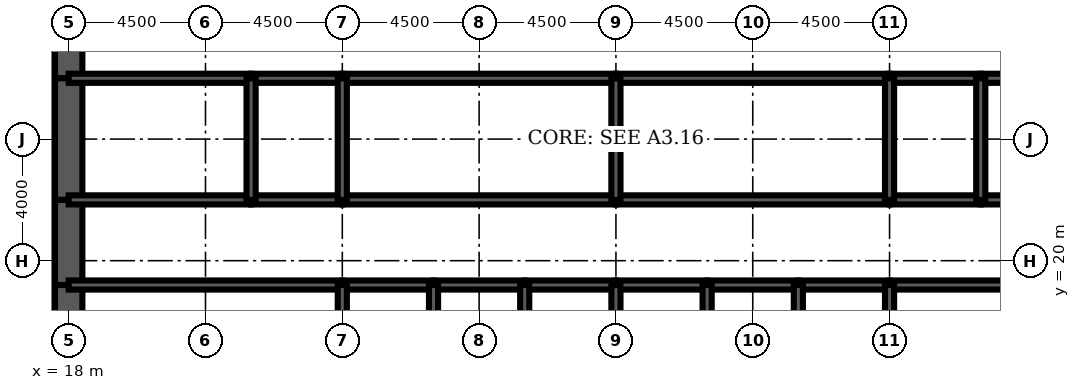
"""IFC4 building model, lengths in metres.
Left out: names, types, materials, properties, quantities, classifications, styles, units other than length and angle.
Written with IfcOpenShell. Run it as: python <this file> out.ifc"""

import sys

from ifc_helpers import new_model, si_unit, direction, frame, frame_2d, origin, place, context, subcontext, project, spatial, rectangle, extrude, element, fill, save


model = new_model("IFC4")
c1 = context("Model", 3, precision=1e-05, world=origin(), true_north=direction((0.0, 1.0)))
c2 = subcontext(c1, "Body", "Model", "MODEL_VIEW")
j1 = project(units=[si_unit("LENGTHUNIT", "METRE"), si_unit("PLANEANGLEUNIT", "RADIAN")], contexts=[c1])
p1 = place(None, origin())
s1 = spatial("IfcSite", under=j1, at=p1, CompositionType="ELEMENT")
p2 = place(p1, origin())
s2 = spatial("IfcBuilding", under=s1, at=p2, CompositionType="ELEMENT")
p3 = place(p2, frame((0.0, 0.0, 68.0)))
s3 = spatial("IfcBuildingStorey", under=s2, at=p3, CompositionType="ELEMENT", Elevation=68.0)
p4 = place(p3, frame((18.0, 28.8, 0.0), z_axis=(0.0, 0.0, 1.0), x_axis=(0.0, -1.0, 0.0)))
e1 = element("IfcWall", 1, at=p4, inside=s3, PredefinedType="SHEAR", context=c2, shape_type="SweptSolid", body=[
    extrude(rectangle(XDim=2.8, YDim=0.9, at=frame_2d((1.4, 0.0))), origin(), (0.0, 0.0, 1.0), 4.5),
])
p5 = place(p4, frame((0.4, 0.0, 0.0)))
e2 = element("IfcOpeningElement", 2, at=p5, cuts=e1, PredefinedType="OPENING", context=c2, shape_type="SweptSolid", body=[
    extrude(rectangle(XDim=1.8, YDim=2.1, at=frame_2d((0.9, 1.05))), frame((0.0, 0.46, 0.0), z_axis=(0.0, -1.0, 0.0), x_axis=(1.0, 0.0, 0.0)), (0.0, 0.0, 1.0), 0.92),
])
p6 = place(p3, frame((18.0, 26.0, 0.0), z_axis=(0.0, 0.0, 1.0), x_axis=(0.0, -1.0, 0.0)))
e3 = element("IfcWall", 3, at=p6, inside=s3, PredefinedType="SHEAR", context=c2, shape_type="SweptSolid", body=[
    extrude(rectangle(XDim=4.0, YDim=0.9, at=frame_2d((2.0, 0.0))), origin(), (0.0, 0.0, 1.0), 4.5),
])
p7 = place(p3, frame((18.0, 22.0, 0.0), z_axis=(0.0, 0.0, 1.0), x_axis=(0.0, -1.0, 0.0)))
e4 = element("IfcWall", 4, at=p7, inside=s3, PredefinedType="SHEAR", context=c2, shape_type="SweptSolid", body=[
    extrude(rectangle(XDim=2.8, YDim=0.9, at=frame_2d((1.4, 0.0))), origin(), (0.0, 0.0, 1.0), 4.5),
])
p8 = place(p7, frame((0.6, 0.0, 0.0)))
e5 = element("IfcOpeningElement", 5, at=p8, cuts=e4, PredefinedType="OPENING", context=c2, shape_type="SweptSolid", body=[
    extrude(rectangle(XDim=1.8, YDim=2.1, at=frame_2d((0.9, 1.05))), frame((0.0, 0.46, 0.0), z_axis=(0.0, -1.0, 0.0), x_axis=(1.0, 0.0, 0.0)), (0.0, 0.0, 1.0), 0.92),
])
p9 = place(p3, frame((18.0, 19.2, 0.0), z_axis=(0.0, 0.0, 1.0), x_axis=(0.0, -1.0, 0.0)))
e6 = element("IfcWall", 6, at=p9, inside=s3, PredefinedType="SHEAR", context=c2, shape_type="SweptSolid", body=[
    extrude(rectangle(XDim=3.2, YDim=0.9, at=frame_2d((1.6, 0.0))), origin(), (0.0, 0.0, 1.0), 4.5),
])
p10 = place(p3, frame((18.0, 19.2, 0.0), z_axis=(0.0, 0.0, 1.0), x_axis=(1.0, 0.0, 0.0)))
e7 = element("IfcWall", 7, at=p10, inside=s3, PredefinedType="SOLIDWALL", context=c2, shape_type="SweptSolid", body=[
    extrude(rectangle(XDim=9.0, YDim=0.3, at=frame_2d((4.5, 0.0))), origin(), (0.0, 0.0, 1.0), 4.5),
])
p11 = place(p10, frame((0.65, 0.0, 0.0)))
e8 = element("IfcOpeningElement", 8, at=p11, cuts=e7, PredefinedType="OPENING", context=c2, shape_type="SweptSolid", body=[
    extrude(rectangle(XDim=1.0, YDim=2.1, at=frame_2d((0.5, 1.05))), frame((0.0, 0.16, 0.0), z_axis=(0.0, -1.0, 0.0), x_axis=(1.0, 0.0, 0.0)), (0.0, 0.0, 1.0), 0.32),
])
p12 = place(p3, frame((27.0, 19.2, 0.0), z_axis=(0.0, 0.0, 1.0), x_axis=(1.0, 0.0, 0.0)))
e9 = element("IfcWall", 9, at=p12, inside=s3, PredefinedType="SOLIDWALL", context=c2, shape_type="SweptSolid", body=[
    extrude(rectangle(XDim=3.0, YDim=0.3, at=frame_2d((1.5, 0.0))), origin(), (0.0, 0.0, 1.0), 4.5),
])
p13 = place(p12, frame((0.95, 0.0, 0.0)))
e10 = element("IfcOpeningElement", 10, at=p13, cuts=e9, PredefinedType="OPENING", context=c2, shape_type="SweptSolid", body=[
    extrude(rectangle(XDim=1.1, YDim=2.2, at=frame_2d((0.55, 1.1))), frame((0.0, 0.16, 0.0), z_axis=(0.0, -1.0, 0.0), x_axis=(1.0, 0.0, 0.0)), (0.0, 0.0, 1.0), 0.32),
])
p14 = place(p3, frame((30.0, 19.2, 0.0), z_axis=(0.0, 0.0, 1.0), x_axis=(1.0, 0.0, 0.0)))
e11 = element("IfcWall", 11, at=p14, inside=s3, PredefinedType="SOLIDWALL", context=c2, shape_type="SweptSolid", body=[
    extrude(rectangle(XDim=3.0, YDim=0.3, at=frame_2d((1.5, 0.0))), origin(), (0.0, 0.0, 1.0), 4.5),
])
p15 = place(p14, frame((0.95, 0.0, 0.0)))
e12 = element("IfcOpeningElement", 12, at=p15, cuts=e11, PredefinedType="OPENING", context=c2, shape_type="SweptSolid", body=[
    extrude(rectangle(XDim=1.1, YDim=2.2, at=frame_2d((0.55, 1.1))), frame((0.0, 0.16, 0.0), z_axis=(0.0, -1.0, 0.0), x_axis=(1.0, 0.0, 0.0)), (0.0, 0.0, 1.0), 0.32),
])
p16 = place(p3, frame((33.0, 19.2, 0.0), z_axis=(0.0, 0.0, 1.0), x_axis=(1.0, 0.0, 0.0)))
e13 = element("IfcWall", 13, at=p16, inside=s3, PredefinedType="SOLIDWALL", context=c2, shape_type="SweptSolid", body=[
    extrude(rectangle(XDim=3.0, YDim=0.3, at=frame_2d((1.5, 0.0))), origin(), (0.0, 0.0, 1.0), 4.5),
])
p17 = place(p16, frame((0.95, 0.0, 0.0)))
e14 = element("IfcOpeningElement", 14, at=p17, cuts=e13, PredefinedType="OPENING", context=c2, shape_type="SweptSolid", body=[
    extrude(rectangle(XDim=1.1, YDim=2.2, at=frame_2d((0.55, 1.1))), frame((0.0, 0.16, 0.0), z_axis=(0.0, -1.0, 0.0), x_axis=(1.0, 0.0, 0.0)), (0.0, 0.0, 1.0), 0.32),
])
p18 = place(p3, frame((36.0, 19.2, 0.0), z_axis=(0.0, 0.0, 1.0), x_axis=(1.0, 0.0, 0.0)))
e15 = element("IfcWall", 15, at=p18, inside=s3, PredefinedType="SOLIDWALL", context=c2, shape_type="SweptSolid", body=[
    extrude(rectangle(XDim=3.0, YDim=0.3, at=frame_2d((1.5, 0.0))), origin(), (0.0, 0.0, 1.0), 4.5),
])
p19 = place(p18, frame((0.95, 0.0, 0.0)))
e16 = element("IfcOpeningElement", 16, at=p19, cuts=e15, PredefinedType="OPENING", context=c2, shape_type="SweptSolid", body=[
    extrude(rectangle(XDim=1.1, YDim=2.2, at=frame_2d((0.55, 1.1))), frame((0.0, 0.16, 0.0), z_axis=(0.0, -1.0, 0.0), x_axis=(1.0, 0.0, 0.0)), (0.0, 0.0, 1.0), 0.32),
])
for number, where, z_axis, x_axis in (
    (17, (39.0, 19.2, 0.0), (0.0, 0.0, 1.0), (1.0, 0.0, 0.0)),
    (18, (42.0, 19.2, 0.0), (0.0, 0.0, 1.0), (1.0, 0.0, 0.0)),
):
    element("IfcWall", number, at=place(p3, frame(where, z_axis=z_axis, x_axis=x_axis)), inside=s3, PredefinedType="SOLIDWALL", context=c2, shape_type="SweptSolid", body=[
        extrude(rectangle(XDim=3.0, YDim=0.3, at=frame_2d((1.5, 0.0))), origin(), (0.0, 0.0, 1.0), 4.5),
    ])
p20 = place(p3, frame((45.0, 19.2, 0.0), z_axis=(0.0, 0.0, 1.0), x_axis=(1.0, 0.0, 0.0)))
e19 = element("IfcWall", 19, at=p20, inside=s3, PredefinedType="SOLIDWALL", context=c2, shape_type="SweptSolid", body=[
    extrude(rectangle(XDim=9.0, YDim=0.3, at=frame_2d((4.5, 0.0))), origin(), (0.0, 0.0, 1.0), 4.5),
])
p21 = place(p20, frame((7.35, 0.0, 0.0)))
e20 = element("IfcOpeningElement", 20, at=p21, cuts=e19, PredefinedType="OPENING", context=c2, shape_type="SweptSolid", body=[
    extrude(rectangle(XDim=1.0, YDim=2.1, at=frame_2d((0.5, 1.05))), frame((0.0, 0.16, 0.0), z_axis=(0.0, -1.0, 0.0), x_axis=(1.0, 0.0, 0.0)), (0.0, 0.0, 1.0), 0.32),
])
p22 = place(p3, frame((18.0, 22.0, 0.0), z_axis=(0.0, 0.0, 1.0), x_axis=(1.0, 0.0, 0.0)))
e21 = element("IfcWall", 21, at=p22, inside=s3, PredefinedType="SOLIDWALL", context=c2, shape_type="SweptSolid", body=[
    extrude(rectangle(XDim=6.0, YDim=0.3, at=frame_2d((3.0, 0.0))), origin(), (0.0, 0.0, 1.0), 4.5),
])
p23 = place(p22, frame((4.4, 0.0, 0.0)))
e22 = element("IfcOpeningElement", 22, at=p23, cuts=e21, PredefinedType="OPENING", context=c2, shape_type="SweptSolid", body=[
    extrude(rectangle(XDim=1.0, YDim=2.1, at=frame_2d((0.5, 1.05))), frame((0.0, 0.16, 0.0), z_axis=(0.0, -1.0, 0.0), x_axis=(1.0, 0.0, 0.0)), (0.0, 0.0, 1.0), 0.32),
])
p24 = place(p22, frame((0.7, 0.0, 0.0)))
e23 = element("IfcOpeningElement", 23, at=p24, cuts=e21, PredefinedType="OPENING", context=c2, shape_type="SweptSolid", body=[
    extrude(rectangle(XDim=1.0, YDim=2.1, at=frame_2d((0.5, 1.05))), frame((0.0, 0.16, 0.0), z_axis=(0.0, -1.0, 0.0), x_axis=(1.0, 0.0, 0.0)), (0.0, 0.0, 1.0), 0.32),
])
p25 = place(p3, frame((24.0, 22.0, 0.0), z_axis=(0.0, 0.0, 1.0), x_axis=(1.0, 0.0, 0.0)))
e24 = element("IfcWall", 24, at=p25, inside=s3, PredefinedType="SOLIDWALL", context=c2, shape_type="SweptSolid", body=[
    extrude(rectangle(XDim=3.0, YDim=0.3, at=frame_2d((1.5, 0.0))), origin(), (0.0, 0.0, 1.0), 4.5),
])
p26 = place(p25, frame((1.0, 0.0, 0.0)))
e25 = element("IfcOpeningElement", 25, at=p26, cuts=e24, PredefinedType="OPENING", context=c2, shape_type="SweptSolid", body=[
    extrude(rectangle(XDim=1.0, YDim=2.1, at=frame_2d((0.5, 1.05))), frame((0.0, 0.16, 0.0), z_axis=(0.0, -1.0, 0.0), x_axis=(1.0, 0.0, 0.0)), (0.0, 0.0, 1.0), 0.32),
])
p27 = place(p3, frame((27.0, 22.0, 0.0), z_axis=(0.0, 0.0, 1.0), x_axis=(1.0, 0.0, 0.0)))
e26 = element("IfcWall", 26, at=p27, inside=s3, PredefinedType="SOLIDWALL", context=c2, shape_type="SweptSolid", body=[
    extrude(rectangle(XDim=9.0, YDim=0.3, at=frame_2d((4.5, 0.0))), origin(), (0.0, 0.0, 1.0), 4.5),
])
p28 = place(p27, frame((4.0, 0.0, 0.0)))
e27 = element("IfcOpeningElement", 27, at=p28, cuts=e26, PredefinedType="OPENING", context=c2, shape_type="SweptSolid", body=[
    extrude(rectangle(XDim=1.0, YDim=2.1, at=frame_2d((0.5, 1.05))), frame((0.0, 0.16, 0.0), z_axis=(0.0, -1.0, 0.0), x_axis=(1.0, 0.0, 0.0)), (0.0, 0.0, 1.0), 0.32),
])
p29 = place(p3, frame((36.0, 22.0, 0.0), z_axis=(0.0, 0.0, 1.0), x_axis=(1.0, 0.0, 0.0)))
e28 = element("IfcWall", 28, at=p29, inside=s3, PredefinedType="SOLIDWALL", context=c2, shape_type="SweptSolid", body=[
    extrude(rectangle(XDim=9.0, YDim=0.3, at=frame_2d((4.5, 0.0))), origin(), (0.0, 0.0, 1.0), 4.5),
])
p30 = place(p29, frame((4.0, 0.0, 0.0)))
e29 = element("IfcOpeningElement", 29, at=p30, cuts=e28, PredefinedType="OPENING", context=c2, shape_type="SweptSolid", body=[
    extrude(rectangle(XDim=1.0, YDim=2.1, at=frame_2d((0.5, 1.05))), frame((0.0, 0.16, 0.0), z_axis=(0.0, -1.0, 0.0), x_axis=(1.0, 0.0, 0.0)), (0.0, 0.0, 1.0), 0.32),
])
p31 = place(p3, frame((45.0, 22.0, 0.0), z_axis=(0.0, 0.0, 1.0), x_axis=(1.0, 0.0, 0.0)))
e30 = element("IfcWall", 30, at=p31, inside=s3, PredefinedType="SOLIDWALL", context=c2, shape_type="SweptSolid", body=[
    extrude(rectangle(XDim=3.0, YDim=0.3, at=frame_2d((1.5, 0.0))), origin(), (0.0, 0.0, 1.0), 4.5),
])
p32 = place(p31, frame((1.0, 0.0, 0.0)))
e31 = element("IfcOpeningElement", 31, at=p32, cuts=e30, PredefinedType="OPENING", context=c2, shape_type="SweptSolid", body=[
    extrude(rectangle(XDim=1.0, YDim=2.1, at=frame_2d((0.5, 1.05))), frame((0.0, 0.16, 0.0), z_axis=(0.0, -1.0, 0.0), x_axis=(1.0, 0.0, 0.0)), (0.0, 0.0, 1.0), 0.32),
])
p33 = place(p3, frame((48.0, 22.0, 0.0), z_axis=(0.0, 0.0, 1.0), x_axis=(1.0, 0.0, 0.0)))
e32 = element("IfcWall", 32, at=p33, inside=s3, PredefinedType="SOLIDWALL", context=c2, shape_type="SweptSolid", body=[
    extrude(rectangle(XDim=6.0, YDim=0.3, at=frame_2d((3.0, 0.0))), origin(), (0.0, 0.0, 1.0), 4.5),
])
p34 = place(p33, frame((2.0, 0.0, 0.0)))
e33 = element("IfcOpeningElement", 33, at=p34, cuts=e32, PredefinedType="OPENING", context=c2, shape_type="SweptSolid", body=[
    extrude(rectangle(XDim=1.0, YDim=2.1, at=frame_2d((0.5, 1.05))), frame((0.0, 0.16, 0.0), z_axis=(0.0, -1.0, 0.0), x_axis=(1.0, 0.0, 0.0)), (0.0, 0.0, 1.0), 0.32),
])
p35 = place(p33, frame((4.0, 0.0, 0.0)))
e34 = element("IfcOpeningElement", 34, at=p35, cuts=e32, PredefinedType="OPENING", context=c2, shape_type="SweptSolid", body=[
    extrude(rectangle(XDim=1.0, YDim=2.1, at=frame_2d((0.5, 1.05))), frame((0.0, 0.16, 0.0), z_axis=(0.0, -1.0, 0.0), x_axis=(1.0, 0.0, 0.0)), (0.0, 0.0, 1.0), 0.32),
])
p36 = place(p3, frame((18.0, 26.0, 0.0), z_axis=(0.0, 0.0, 1.0), x_axis=(1.0, 0.0, 0.0)))
e35 = element("IfcWall", 35, at=p36, inside=s3, PredefinedType="SOLIDWALL", context=c2, shape_type="SweptSolid", body=[
    extrude(rectangle(XDim=6.0, YDim=0.3, at=frame_2d((3.0, 0.0))), origin(), (0.0, 0.0, 1.0), 4.5),
])
p37 = place(p3, frame((24.0, 26.0, 0.0), z_axis=(0.0, 0.0, 1.0), x_axis=(1.0, 0.0, 0.0)))
e36 = element("IfcWall", 36, at=p37, inside=s3, PredefinedType="SOLIDWALL", context=c2, shape_type="SweptSolid", body=[
    extrude(rectangle(XDim=3.0, YDim=0.3, at=frame_2d((1.5, 0.0))), origin(), (0.0, 0.0, 1.0), 4.5),
])
for number, where, z_axis, x_axis in (
    (37, (27.0, 26.0, 0.0), (0.0, 0.0, 1.0), (1.0, 0.0, 0.0)),
    (38, (36.0, 26.0, 0.0), (0.0, 0.0, 1.0), (1.0, 0.0, 0.0)),
):
    element("IfcWall", number, at=place(p3, frame(where, z_axis=z_axis, x_axis=x_axis)), inside=s3, PredefinedType="SOLIDWALL", context=c2, shape_type="SweptSolid", body=[
        extrude(rectangle(XDim=9.0, YDim=0.3, at=frame_2d((4.5, 0.0))), origin(), (0.0, 0.0, 1.0), 4.5),
    ])
p38 = place(p3, frame((45.0, 26.0, 0.0), z_axis=(0.0, 0.0, 1.0), x_axis=(1.0, 0.0, 0.0)))
e39 = element("IfcWall", 39, at=p38, inside=s3, PredefinedType="SOLIDWALL", context=c2, shape_type="SweptSolid", body=[
    extrude(rectangle(XDim=3.0, YDim=0.3, at=frame_2d((1.5, 0.0))), origin(), (0.0, 0.0, 1.0), 4.5),
])
p39 = place(p3, frame((48.0, 26.0, 0.0), z_axis=(0.0, 0.0, 1.0), x_axis=(1.0, 0.0, 0.0)))
e40 = element("IfcWall", 40, at=p39, inside=s3, PredefinedType="SOLIDWALL", context=c2, shape_type="SweptSolid", body=[
    extrude(rectangle(XDim=6.0, YDim=0.3, at=frame_2d((3.0, 0.0))), origin(), (0.0, 0.0, 1.0), 4.5),
])
for number, where, z_axis, x_axis in (
    (41, (27.0, 16.0, 0.0), (0.0, 0.0, 1.0), (0.0, 1.0, 0.0)),
    (42, (30.0, 16.0, 0.0), (0.0, 0.0, 1.0), (0.0, 1.0, 0.0)),
    (43, (33.0, 16.0, 0.0), (0.0, 0.0, 1.0), (0.0, 1.0, 0.0)),
    (44, (36.0, 16.0, 0.0), (0.0, 0.0, 1.0), (0.0, 1.0, 0.0)),
    (45, (39.0, 16.0, 0.0), (0.0, 0.0, 1.0), (0.0, 1.0, 0.0)),
    (46, (42.0, 16.0, 0.0), (0.0, 0.0, 1.0), (0.0, 1.0, 0.0)),
    (47, (45.0, 16.0, 0.0), (0.0, 0.0, 1.0), (0.0, 1.0, 0.0)),
):
    element("IfcWall", number, at=place(p3, frame(where, z_axis=z_axis, x_axis=x_axis)), inside=s3, PredefinedType="SOLIDWALL", context=c2, shape_type="SweptSolid", body=[
        extrude(rectangle(XDim=3.2, YDim=0.3, at=frame_2d((1.6, 0.0))), origin(), (0.0, 0.0, 1.0), 4.5),
    ])
for number, where, z_axis, x_axis in (
    (48, (24.0, 22.0, 0.0), (0.0, 0.0, 1.0), (0.0, 1.0, 0.0)),
    (49, (27.0, 22.0, 0.0), (0.0, 0.0, 1.0), (0.0, 1.0, 0.0)),
    (50, (36.0, 22.0, 0.0), (0.0, 0.0, 1.0), (0.0, 1.0, 0.0)),
    (51, (45.0, 22.0, 0.0), (0.0, 0.0, 1.0), (0.0, 1.0, 0.0)),
    (52, (48.0, 22.0, 0.0), (0.0, 0.0, 1.0), (0.0, 1.0, 0.0)),
):
    element("IfcWall", number, at=place(p3, frame(where, z_axis=z_axis, x_axis=x_axis)), inside=s3, PredefinedType="SOLIDWALL", context=c2, shape_type="SweptSolid", body=[
        extrude(rectangle(XDim=4.0, YDim=0.3, at=frame_2d((2.0, 0.0))), origin(), (0.0, 0.0, 1.0), 4.5),
    ])
p40 = place(p3, frame((42.0, 22.15, 0.0), z_axis=(0.0, 0.0, 1.0), x_axis=(0.0, 1.0, 0.0)))
e53 = element("IfcWall", 53, at=p40, inside=s3, PredefinedType="PARTITIONING", context=c2, shape_type="SweptSolid", body=[
    extrude(rectangle(XDim=3.7, YDim=0.15, at=frame_2d((1.85, 0.0))), origin(), (0.0, 0.0, 1.0), 3.0),
])
p41 = place(p40, frame((2.2, 0.0, 0.0)))
e54 = element("IfcOpeningElement", 54, at=p41, cuts=e53, PredefinedType="OPENING", context=c2, shape_type="SweptSolid", body=[
    extrude(rectangle(XDim=1.0, YDim=2.1, at=frame_2d((0.5, 1.05))), frame((0.0, 0.085, 0.0), z_axis=(0.0, -1.0, 0.0), x_axis=(1.0, 0.0, 0.0)), (0.0, 0.0, 1.0), 0.17),
])
p42 = place(p3, frame((20.025, 22.15, 0.0), z_axis=(0.0, 0.0, 1.0), x_axis=(0.0, 1.0, 0.0)))
e55 = element("IfcWall", 55, at=p42, inside=s3, PredefinedType="PARTITIONING", context=c2, shape_type="SweptSolid", body=[
    extrude(rectangle(XDim=3.7, YDim=0.15, at=frame_2d((1.85, 0.0))), origin(), (0.0, 0.0, 1.0), 3.0),
])
p43 = place(p3, frame((47.7, 19.35, 0.0), z_axis=(0.0, 0.0, 1.0), x_axis=(0.0, 1.0, 0.0)))
e56 = element("IfcWall", 56, at=p43, inside=s3, PredefinedType="PARTITIONING", context=c2, shape_type="SweptSolid", body=[
    extrude(rectangle(XDim=2.5, YDim=0.15, at=frame_2d((1.25, 0.0))), origin(), (0.0, 0.0, 1.0), 3.0),
])
p44 = place(p43, frame((1.15, 0.0, 0.0)))
e57 = element("IfcOpeningElement", 57, at=p44, cuts=e56, PredefinedType="OPENING", context=c2, shape_type="SweptSolid", body=[
    extrude(rectangle(XDim=1.0, YDim=2.1, at=frame_2d((0.5, 1.05))), frame((0.0, 0.085, 0.0), z_axis=(0.0, -1.0, 0.0), x_axis=(1.0, 0.0, 0.0)), (0.0, 0.0, 1.0), 0.17),
])
p45 = place(p41, origin())
e58 = element("IfcDoor", 58, at=p45, inside=s3, OperationType="SINGLE_SWING_RIGHT", PredefinedType="DOOR", context=c2, shape_type="SweptSolid", body=[
    extrude(rectangle(XDim=1.0, YDim=2.1, at=frame_2d((0.5, 1.05))), frame((0.0, 0.025, 0.0), z_axis=(0.0, -1.0, 0.0), x_axis=(1.0, 0.0, 0.0)), (0.0, 0.0, 1.0), 0.05),
])
fill(e54, e58)
p46 = place(p44, origin())
e59 = element("IfcDoor", 59, at=p46, inside=s3, OperationType="SINGLE_SWING_RIGHT", PredefinedType="DOOR", context=c2, shape_type="SweptSolid", body=[
    extrude(rectangle(XDim=1.0, YDim=2.1, at=frame_2d((0.5, 1.05))), frame((0.0, 0.025, 0.0), z_axis=(0.0, -1.0, 0.0), x_axis=(1.0, 0.0, 0.0)), (0.0, 0.0, 1.0), 0.05),
])
fill(e57, e59)
p47 = place(p13, origin())
e60 = element("IfcDoor", 60, at=p47, inside=s3, OperationType="DOUBLE_DOOR_SLIDING", PredefinedType="USERDEFINED", context=c2, shape_type="SweptSolid", body=[
    extrude(rectangle(XDim=1.1, YDim=2.2, at=frame_2d((0.55, 1.1))), frame((0.0, 0.025, 0.0), z_axis=(0.0, -1.0, 0.0), x_axis=(1.0, 0.0, 0.0)), (0.0, 0.0, 1.0), 0.05),
])
fill(e10, e60)
p48 = place(p15, origin())
e61 = element("IfcDoor", 61, at=p48, inside=s3, OperationType="DOUBLE_DOOR_SLIDING", PredefinedType="USERDEFINED", context=c2, shape_type="SweptSolid", body=[
    extrude(rectangle(XDim=1.1, YDim=2.2, at=frame_2d((0.55, 1.1))), frame((0.0, 0.025, 0.0), z_axis=(0.0, -1.0, 0.0), x_axis=(1.0, 0.0, 0.0)), (0.0, 0.0, 1.0), 0.05),
])
fill(e12, e61)
p49 = place(p17, origin())
e62 = element("IfcDoor", 62, at=p49, inside=s3, OperationType="DOUBLE_DOOR_SLIDING", PredefinedType="USERDEFINED", context=c2, shape_type="SweptSolid", body=[
    extrude(rectangle(XDim=1.1, YDim=2.2, at=frame_2d((0.55, 1.1))), frame((0.0, 0.025, 0.0), z_axis=(0.0, -1.0, 0.0), x_axis=(1.0, 0.0, 0.0)), (0.0, 0.0, 1.0), 0.05),
])
fill(e14, e62)
p50 = place(p19, origin())
e63 = element("IfcDoor", 63, at=p50, inside=s3, OperationType="DOUBLE_DOOR_SLIDING", PredefinedType="USERDEFINED", context=c2, shape_type="SweptSolid", body=[
    extrude(rectangle(XDim=1.1, YDim=2.2, at=frame_2d((0.55, 1.1))), frame((0.0, 0.025, 0.0), z_axis=(0.0, -1.0, 0.0), x_axis=(1.0, 0.0, 0.0)), (0.0, 0.0, 1.0), 0.05),
])
fill(e16, e63)
p51 = place(p11, origin())
e64 = element("IfcDoor", 64, at=p51, inside=s3, OperationType="SINGLE_SWING_LEFT", PredefinedType="DOOR", context=c2, shape_type="SweptSolid", body=[
    extrude(rectangle(XDim=1.0, YDim=2.1, at=frame_2d((0.5, 1.05))), frame((0.0, 0.025, 0.0), z_axis=(0.0, -1.0, 0.0), x_axis=(1.0, 0.0, 0.0)), (0.0, 0.0, 1.0), 0.05),
])
fill(e8, e64)
p52 = place(p8, origin())
e65 = element("IfcDoor", 65, at=p52, inside=s3, OperationType="SINGLE_SWING_LEFT", PredefinedType="DOOR", context=c2, shape_type="SweptSolid", body=[
    extrude(rectangle(XDim=1.8, YDim=2.1, at=frame_2d((0.9, 1.05))), frame((0.0, 0.45, 0.0), z_axis=(0.0, -1.0, 0.0), x_axis=(1.0, 0.0, 0.0)), (0.0, 0.0, 1.0), 0.899),
])
fill(e5, e65)
p53 = place(p5, origin())
e66 = element("IfcDoor", 66, at=p53, inside=s3, OperationType="SINGLE_SWING_LEFT", PredefinedType="DOOR", context=c2, shape_type="SweptSolid", body=[
    extrude(rectangle(XDim=1.8, YDim=2.1, at=frame_2d((0.9, 1.05))), frame((0.0, 0.45, 0.0), z_axis=(0.0, -1.0, 0.0), x_axis=(1.0, 0.0, 0.0)), (0.0, 0.0, 1.0), 0.899),
])
fill(e2, e66)
p54 = place(p23, origin())
e67 = element("IfcDoor", 67, at=p54, inside=s3, OperationType="SINGLE_SWING_RIGHT", PredefinedType="DOOR", context=c2, shape_type="SweptSolid", body=[
    extrude(rectangle(XDim=1.0, YDim=2.1, at=frame_2d((0.5, 1.05))), frame((0.0, 0.025, 0.0), z_axis=(0.0, -1.0, 0.0), x_axis=(1.0, 0.0, 0.0)), (0.0, 0.0, 1.0), 0.05),
])
fill(e22, e67)
p55 = place(p26, origin())
e68 = element("IfcDoor", 68, at=p55, inside=s3, OperationType="SINGLE_SWING_LEFT", PredefinedType="DOOR", context=c2, shape_type="SweptSolid", body=[
    extrude(rectangle(XDim=1.0, YDim=2.1, at=frame_2d((0.5, 1.05))), frame((0.0, 0.025, 0.0), z_axis=(0.0, -1.0, 0.0), x_axis=(1.0, 0.0, 0.0)), (0.0, 0.0, 1.0), 0.05),
])
fill(e25, e68)
p56 = place(p28, origin())
e69 = element("IfcDoor", 69, at=p56, inside=s3, OperationType="SINGLE_SWING_LEFT", PredefinedType="DOOR", context=c2, shape_type="SweptSolid", body=[
    extrude(rectangle(XDim=1.0, YDim=2.1, at=frame_2d((0.5, 1.05))), frame((0.0, 0.025, 0.0), z_axis=(0.0, -1.0, 0.0), x_axis=(1.0, 0.0, 0.0)), (0.0, 0.0, 1.0), 0.05),
])
fill(e27, e69)
p57 = place(p30, origin())
e70 = element("IfcDoor", 70, at=p57, inside=s3, OperationType="SINGLE_SWING_LEFT", PredefinedType="DOOR", context=c2, shape_type="SweptSolid", body=[
    extrude(rectangle(XDim=1.0, YDim=2.1, at=frame_2d((0.5, 1.05))), frame((0.0, 0.025, 0.0), z_axis=(0.0, -1.0, 0.0), x_axis=(1.0, 0.0, 0.0)), (0.0, 0.0, 1.0), 0.05),
])
fill(e29, e70)
p58 = place(p32, origin())
e71 = element("IfcDoor", 71, at=p58, inside=s3, OperationType="SINGLE_SWING_LEFT", PredefinedType="DOOR", context=c2, shape_type="SweptSolid", body=[
    extrude(rectangle(XDim=1.0, YDim=2.1, at=frame_2d((0.5, 1.05))), frame((0.0, 0.025, 0.0), z_axis=(0.0, -1.0, 0.0), x_axis=(1.0, 0.0, 0.0)), (0.0, 0.0, 1.0), 0.05),
])
fill(e31, e71)
p59 = place(p24, origin())
e72 = element("IfcDoor", 72, at=p59, inside=s3, OperationType="SINGLE_SWING_LEFT", PredefinedType="DOOR", context=c2, shape_type="SweptSolid", body=[
    extrude(rectangle(XDim=1.0, YDim=2.1, at=frame_2d((0.5, 1.05))), frame((0.0, 0.025, 0.0), z_axis=(0.0, -1.0, 0.0), x_axis=(1.0, 0.0, 0.0)), (0.0, 0.0, 1.0), 0.05),
])
fill(e23, e72)
save(model, sys.argv[1])
